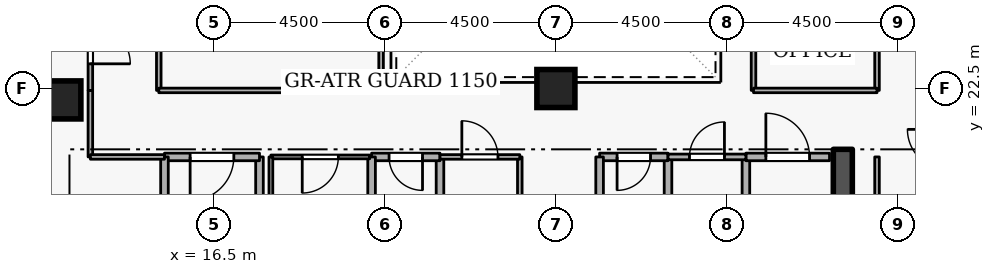
"""IFC4 building model, lengths in metres.
Left out: names, types, materials, properties, quantities, classifications, styles, units other than length and angle.
Written with IfcOpenShell. Run it as: python <this file> out.ifc"""

import sys

from ifc_helpers import new_model, si_unit, direction, frame, frame_2d, origin, origin_2d, place, context, subcontext, project, spatial, rectangle, extrude, element, fill, save


model = new_model("IFC4")
c1 = context("Model", 3, precision=1e-05, world=origin(), true_north=direction((0.0, 1.0)))
c2 = subcontext(c1, "Body", "Model", "MODEL_VIEW")
j1 = project(units=[si_unit("LENGTHUNIT", "METRE"), si_unit("PLANEANGLEUNIT", "RADIAN")], contexts=[c1])
p1 = place(None, origin())
s1 = spatial("IfcSite", under=j1, at=p1, CompositionType="ELEMENT")
p2 = place(p1, origin())
s2 = spatial("IfcBuilding", under=s1, at=p2, CompositionType="ELEMENT")
p3 = place(p2, frame((0.0, 0.0, 233.1)))
s3 = spatial("IfcBuildingStorey", under=s2, at=p3, CompositionType="ELEMENT", Elevation=233.1)
p4 = place(p3, frame((33.05, 15.1, 0.0), z_axis=(0.0, 0.0, 1.0), x_axis=(0.0, 1.0, 0.0)))
e1 = element("IfcWall", 1, at=p4, inside=s3, PredefinedType="SHEAR", context=c2, shape_type="SweptSolid", body=[
    extrude(rectangle(XDim=5.8, YDim=0.5, at=frame_2d((2.9, 0.0))), origin(), (0.0, 0.0, 1.0), 3.6),
])
for number, where, z_axis, x_axis in (
    (2, (12.5, 22.2, 0.0), (0.0, 0.0, 1.0), (1.0, 0.0, 0.0)),
    (3, (25.5, 22.5, 0.0), (0.0, 0.0, 1.0), (1.0, 0.0, 0.0)),
):
    element("IfcColumn", number, at=place(p3, frame(where, z_axis=z_axis, x_axis=x_axis)), inside=s3, PredefinedType="COLUMN", context=c2, shape_type="SweptSolid", body=[
        extrude(rectangle(XDim=1.0, YDim=1.0, at=origin_2d()), origin(), (0.0, 0.0, 1.0), 3.6),
    ])
p5 = place(p3, frame((17.7, 18.4, 0.0), z_axis=(0.0, 0.0, 1.0), x_axis=(0.0, 1.0, 0.0)))
e4 = element("IfcWall", 4, at=p5, inside=s3, PredefinedType="STANDARD", context=c2, shape_type="SweptSolid", body=[
    extrude(rectangle(XDim=2.3, YDim=0.2, at=frame_2d((1.15, 0.0))), origin(), (0.0, 0.0, 1.0), 2.545),
])
p6 = place(p3, frame((17.7, 20.7, 0.0), z_axis=(0.0, 0.0, 1.0), x_axis=(-1.0, 0.0, 0.0)))
e5 = element("IfcWall", 5, at=p6, inside=s3, PredefinedType="STANDARD", context=c2, shape_type="SweptSolid", body=[
    extrude(rectangle(XDim=2.5, YDim=0.2, at=frame_2d((1.25, 0.0))), origin(), (0.0, 0.0, 1.0), 3.34),
])
p7 = place(p6, frame((0.675, 0.0, 0.0)))
e6 = element("IfcOpeningElement", 6, at=p7, cuts=e5, PredefinedType="OPENING", context=c2, shape_type="SweptSolid", body=[
    extrude(rectangle(XDim=1.15, YDim=2.1, at=frame_2d((0.575, 1.05))), frame((0.0, 0.11, 0.0), z_axis=(0.0, -1.0, 0.0), x_axis=(1.0, 0.0, 0.0)), (0.0, 0.0, 1.0), 0.22),
])
p8 = place(p3, frame((15.2, 20.7, 0.0), z_axis=(0.0, 0.0, 1.0), x_axis=(0.0, -1.0, 0.0)))
e7 = element("IfcWall", 7, at=p8, inside=s3, PredefinedType="STANDARD", context=c2, shape_type="SweptSolid", body=[
    extrude(rectangle(XDim=5.7, YDim=0.2, at=frame_2d((2.85, 0.0))), origin(), (0.0, 0.0, 1.0), 3.34),
])
p9 = place(p3, frame((28.45, 18.65, 0.0), z_axis=(0.0, 0.0, 1.0), x_axis=(0.0, 1.0, 0.0)))
e8 = element("IfcWall", 8, at=p9, inside=s3, PredefinedType="STANDARD", context=c2, shape_type="SweptSolid", body=[
    extrude(rectangle(XDim=2.05, YDim=0.2, at=frame_2d((1.025, 0.0))), origin(), (0.0, 0.0, 1.0), 3.34),
])
p10 = place(p3, frame((28.45, 20.7, 0.0), z_axis=(0.0, 0.0, 1.0), x_axis=(-1.0, 0.0, 0.0)))
e9 = element("IfcWall", 9, at=p10, inside=s3, PredefinedType="STANDARD", context=c2, shape_type="SweptSolid", body=[
    extrude(rectangle(XDim=1.8, YDim=0.2, at=frame_2d((0.9, 0.0))), origin(), (0.0, 0.0, 1.0), 3.34),
])
p11 = place(p10, frame((0.46, 0.0, 0.0)))
e10 = element("IfcOpeningElement", 10, at=p11, cuts=e9, PredefinedType="OPENING", context=c2, shape_type="SweptSolid", body=[
    extrude(rectangle(XDim=0.88, YDim=2.04, at=frame_2d((0.44, 1.02))), frame((0.0, 0.11, 0.0), z_axis=(0.0, -1.0, 0.0), x_axis=(1.0, 0.0, 0.0)), (0.0, 0.0, 1.0), 0.22),
])
for number, where, z_axis, x_axis in (
    (11, (26.65, 20.7, 0.0), (0.0, 0.0, 1.0), (0.0, -1.0, 0.0)),
    (12, (22.45, 18.65, 0.0), (0.0, 0.0, 1.0), (0.0, 1.0, 0.0)),
):
    element("IfcWall", number, at=place(p3, frame(where, z_axis=z_axis, x_axis=x_axis)), inside=s3, PredefinedType="STANDARD", context=c2, shape_type="SweptSolid", body=[
        extrude(rectangle(XDim=2.05, YDim=0.2, at=frame_2d((1.025, 0.0))), origin(), (0.0, 0.0, 1.0), 3.34),
    ])
p12 = place(p3, frame((22.45, 20.7, 0.0), z_axis=(0.0, 0.0, 1.0), x_axis=(-1.0, 0.0, 0.0)))
e13 = element("IfcWall", 13, at=p12, inside=s3, PredefinedType="STANDARD", context=c2, shape_type="SweptSolid", body=[
    extrude(rectangle(XDim=1.8, YDim=0.2, at=frame_2d((0.9, 0.0))), origin(), (0.0, 0.0, 1.0), 3.34),
])
p13 = place(p12, frame((0.46, 0.0, 0.0)))
e14 = element("IfcOpeningElement", 14, at=p13, cuts=e13, PredefinedType="OPENING", context=c2, shape_type="SweptSolid", body=[
    extrude(rectangle(XDim=0.88, YDim=2.04, at=frame_2d((0.44, 1.02))), frame((0.0, 0.11, 0.0), z_axis=(0.0, -1.0, 0.0), x_axis=(1.0, 0.0, 0.0)), (0.0, 0.0, 1.0), 0.22),
])
for number, where, z_axis, x_axis in (
    (15, (20.65, 20.7, 0.0), (0.0, 0.0, 1.0), (0.0, -1.0, 0.0)),
    (16, (30.5, 18.65, 0.0), (0.0, 0.0, 1.0), (0.0, 1.0, 0.0)),
):
    element("IfcWall", number, at=place(p3, frame(where, z_axis=z_axis, x_axis=x_axis)), inside=s3, PredefinedType="STANDARD", context=c2, shape_type="SweptSolid", body=[
        extrude(rectangle(XDim=2.05, YDim=0.2, at=frame_2d((1.025, 0.0))), origin(), (0.0, 0.0, 1.0), 3.34),
    ])
p14 = place(p3, frame((30.5, 20.7, 0.0), z_axis=(0.0, 0.0, 1.0), x_axis=(1.0, 0.0, 0.0)))
e17 = element("IfcWall", 17, at=p14, inside=s3, PredefinedType="STANDARD", context=c2, shape_type="SweptSolid", body=[
    extrude(rectangle(XDim=2.2, YDim=0.2, at=frame_2d((1.1, 0.0))), origin(), (0.0, 0.0, 1.0), 3.34),
])
p15 = place(p14, frame((0.525, 0.0, 0.0)))
e18 = element("IfcOpeningElement", 18, at=p15, cuts=e17, PredefinedType="OPENING", context=c2, shape_type="SweptSolid", body=[
    extrude(rectangle(XDim=1.15, YDim=2.1, at=frame_2d((0.575, 1.05))), frame((0.0, 0.11, 0.0), z_axis=(0.0, -1.0, 0.0), x_axis=(1.0, 0.0, 0.0)), (0.0, 0.0, 1.0), 0.22),
])
p16 = place(p3, frame((20.6, 20.7, 0.0), z_axis=(0.0, 0.0, 1.0), x_axis=(-1.0, 0.0, 0.0)))
e19 = element("IfcWall", 19, at=p16, inside=s3, PredefinedType="PARTITIONING", context=c2, shape_type="SweptSolid", body=[
    extrude(rectangle(XDim=2.6, YDim=0.1, at=frame_2d((1.3, 0.0))), origin(), (0.0, 0.0, 1.0), 3.34),
])
p17 = place(p16, frame((0.825, 0.0, 0.0)))
e20 = element("IfcOpeningElement", 20, at=p17, cuts=e19, PredefinedType="OPENING", context=c2, shape_type="SweptSolid", body=[
    extrude(rectangle(XDim=0.95, YDim=2.1, at=frame_2d((0.475, 1.05))), frame((0.0, 0.06, 0.0), z_axis=(0.0, -1.0, 0.0), x_axis=(1.0, 0.0, 0.0)), (0.0, 0.0, 1.0), 0.12),
])
p18 = place(p3, frame((18.0, 20.7, 0.0), z_axis=(0.0, 0.0, 1.0), x_axis=(0.0, -1.0, 0.0)))
e21 = element("IfcWall", 21, at=p18, inside=s3, PredefinedType="PARTITIONING", context=c2, shape_type="SweptSolid", body=[
    extrude(rectangle(XDim=2.05, YDim=0.1, at=frame_2d((1.025, 0.0))), origin(), (0.0, 0.0, 1.0), 2.545),
])
p19 = place(p3, frame((24.55, 20.7, 0.0), z_axis=(0.0, 0.0, 1.0), x_axis=(0.0, -1.0, 0.0)))
e22 = element("IfcWall", 22, at=p19, inside=s3, PredefinedType="PARTITIONING", context=c2, shape_type="SweptSolid", body=[
    extrude(rectangle(XDim=2.05, YDim=0.12, at=frame_2d((1.025, 0.0))), origin(), (0.0, 0.0, 1.0), 3.34),
])
p20 = place(p3, frame((22.45, 20.7, 0.0), z_axis=(0.0, 0.0, 1.0), x_axis=(1.0, 0.0, 0.0)))
e23 = element("IfcWall", 23, at=p20, inside=s3, PredefinedType="PARTITIONING", context=c2, shape_type="SweptSolid", body=[
    extrude(rectangle(XDim=2.1, YDim=0.12, at=frame_2d((1.05, 0.0))), origin(), (0.0, 0.0, 1.0), 3.34),
])
p21 = place(p20, frame((0.575, 0.0, 0.0)))
e24 = element("IfcOpeningElement", 24, at=p21, cuts=e23, PredefinedType="OPENING", context=c2, shape_type="SweptSolid", body=[
    extrude(rectangle(XDim=0.95, YDim=2.1, at=frame_2d((0.475, 1.05))), frame((0.0, 0.07, 0.0), z_axis=(0.0, -1.0, 0.0), x_axis=(1.0, 0.0, 0.0)), (0.0, 0.0, 1.0), 0.14),
])
p22 = place(p3, frame((28.45, 20.7, 0.0), z_axis=(0.0, 0.0, 1.0), x_axis=(1.0, 0.0, 0.0)))
e25 = element("IfcWall", 25, at=p22, inside=s3, PredefinedType="PARTITIONING", context=c2, shape_type="SweptSolid", body=[
    extrude(rectangle(XDim=2.05, YDim=0.15, at=frame_2d((1.025, 0.0))), origin(), (0.0, 0.0, 1.0), 3.34),
])
p23 = place(p22, frame((0.565, 0.0, 0.0)))
e26 = element("IfcOpeningElement", 26, at=p23, cuts=e25, PredefinedType="OPENING", context=c2, shape_type="SweptSolid", body=[
    extrude(rectangle(XDim=0.92, YDim=2.08, at=frame_2d((0.46, 1.04))), frame((0.0, 0.085, 0.0), z_axis=(0.0, -1.0, 0.0), x_axis=(1.0, 0.0, 0.0)), (0.0, 0.0, 1.0), 0.17),
])
p24 = place(p3, frame((33.95, 20.7, 0.0), z_axis=(0.0, 0.0, 1.0), x_axis=(0.0, -1.0, 0.0)))
e27 = element("IfcWall", 27, at=p24, inside=s3, PredefinedType="PARTITIONING", context=c2, shape_type="SweptSolid", body=[
    extrude(rectangle(XDim=5.9, YDim=0.12, at=frame_2d((2.95, 0.0))), origin(), (0.0, 0.0, 1.0), 3.34),
])
p25 = place(p3, frame((13.25, 22.45, 0.0), z_axis=(0.0, 0.0, 1.0), x_axis=(0.0, -1.0, 0.0)))
e28 = element("IfcWall", 28, at=p25, inside=s3, PredefinedType="PARTITIONING", context=c2, shape_type="SweptSolid", body=[
    extrude(rectangle(XDim=1.75, YDim=0.12, at=frame_2d((0.875, 0.0))), origin(), (0.0, 0.0, 1.0), 3.34),
])
p26 = place(p3, frame((13.25, 20.7, 0.0), z_axis=(0.0, 0.0, 1.0), x_axis=(1.0, 0.0, 0.0)))
e29 = element("IfcWall", 29, at=p26, inside=s3, PredefinedType="PARTITIONING", context=c2, shape_type="SweptSolid", body=[
    extrude(rectangle(XDim=1.95, YDim=0.12, at=frame_2d((0.975, 0.0))), origin(), (0.0, 0.0, 1.0), 3.34),
])
p27 = place(p3, frame((13.25, 24.9, 0.0), z_axis=(0.0, 0.0, 1.0), x_axis=(0.0, -1.0, 0.0)))
e30 = element("IfcWall", 30, at=p27, inside=s3, PredefinedType="PARTITIONING", context=c2, shape_type="SweptSolid", body=[
    extrude(rectangle(XDim=2.45, YDim=0.12, at=frame_2d((1.225, 0.0))), origin(), (0.0, 0.0, 1.0), 3.34),
])
p28 = place(p27, frame((0.7, 0.0, 0.0)))
e31 = element("IfcOpeningElement", 31, at=p28, cuts=e30, PredefinedType="OPENING", context=c2, shape_type="SweptSolid", body=[
    extrude(rectangle(XDim=1.05, YDim=2.1, at=frame_2d((0.525, 1.05))), frame((0.0, 0.07, 0.0), z_axis=(0.0, -1.0, 0.0), x_axis=(1.0, 0.0, 0.0)), (0.0, 0.0, 1.0), 0.14),
])
p29 = place(p3, frame((15.05, 22.45, 0.0), z_axis=(0.0, 0.0, 1.0), x_axis=(0.0, 1.0, 0.0)))
e32 = element("IfcWall", 32, at=p29, inside=s3, PredefinedType="PARTITIONING", context=c2, shape_type="SweptSolid", body=[
    extrude(rectangle(XDim=9.1, YDim=0.12, at=frame_2d((4.55, 0.0))), origin(), (0.0, 0.0, 1.0), 3.34),
])
p30 = place(p29, frame((4.075, 0.0, 0.0)))
e33 = element("IfcOpeningElement", 33, at=p30, cuts=e32, PredefinedType="OPENING", context=c2, shape_type="SweptSolid", body=[
    extrude(rectangle(XDim=0.95, YDim=2.1, at=frame_2d((0.475, 1.05))), frame((0.0, 0.07, 0.0), z_axis=(0.0, -1.0, 0.0), x_axis=(1.0, 0.0, 0.0)), (0.0, 0.0, 1.0), 0.14),
])
p31 = place(p3, frame((20.9, 31.55, 0.0), z_axis=(0.0, 0.0, 1.0), x_axis=(0.0, -1.0, 0.0)))
e34 = element("IfcWall", 34, at=p31, inside=s3, PredefinedType="PARTITIONING", context=c2, shape_type="SweptSolid", body=[
    extrude(rectangle(XDim=9.1, YDim=0.12, at=frame_2d((4.55, 0.0))), origin(), (0.0, 0.0, 1.0), 3.34),
])
p32 = place(p3, frame((20.9, 22.45, 0.0), z_axis=(0.0, 0.0, 1.0), x_axis=(-1.0, 0.0, 0.0)))
e35 = element("IfcWall", 35, at=p32, inside=s3, PredefinedType="PARTITIONING", context=c2, shape_type="SweptSolid", body=[
    extrude(rectangle(XDim=5.85, YDim=0.12, at=frame_2d((2.925, 0.0))), origin(), (0.0, 0.0, 1.0), 3.34),
])
p33 = place(p3, frame((30.7, 22.45, 0.0), z_axis=(0.0, 0.0, 1.0), x_axis=(0.0, 1.0, 0.0)))
e36 = element("IfcWall", 36, at=p33, inside=s3, PredefinedType="PARTITIONING", context=c2, shape_type="SweptSolid", body=[
    extrude(rectangle(XDim=9.1, YDim=0.12, at=frame_2d((4.55, 0.0))), origin(), (0.0, 0.0, 1.0), 3.34),
])
p34 = place(p3, frame((33.95, 31.55, 0.0), z_axis=(0.0, 0.0, 1.0), x_axis=(0.0, -1.0, 0.0)))
e37 = element("IfcWall", 37, at=p34, inside=s3, PredefinedType="PARTITIONING", context=c2, shape_type="SweptSolid", body=[
    extrude(rectangle(XDim=9.1, YDim=0.12, at=frame_2d((4.55, 0.0))), origin(), (0.0, 0.0, 1.0), 3.34),
])
p35 = place(p34, frame((4.075, 0.0, 0.0)))
e38 = element("IfcOpeningElement", 38, at=p35, cuts=e37, PredefinedType="OPENING", context=c2, shape_type="SweptSolid", body=[
    extrude(rectangle(XDim=0.95, YDim=2.1, at=frame_2d((0.475, 1.05))), frame((0.0, 0.07, 0.0), z_axis=(0.0, -1.0, 0.0), x_axis=(1.0, 0.0, 0.0)), (0.0, 0.0, 1.0), 0.14),
])
p36 = place(p3, frame((33.95, 22.45, 0.0), z_axis=(0.0, 0.0, 1.0), x_axis=(-1.0, 0.0, 0.0)))
e39 = element("IfcWall", 39, at=p36, inside=s3, PredefinedType="PARTITIONING", context=c2, shape_type="SweptSolid", body=[
    extrude(rectangle(XDim=3.25, YDim=0.12, at=frame_2d((1.625, 0.0))), origin(), (0.0, 0.0, 1.0), 3.34),
])
p37 = place(p7, origin())
e40 = element("IfcDoor", 40, at=p37, inside=s3, OperationType="SINGLE_SWING_RIGHT", PredefinedType="DOOR", context=c2, shape_type="SweptSolid", body=[
    extrude(rectangle(XDim=1.15, YDim=2.1, at=frame_2d((0.575, 1.05))), frame((0.0, 0.025, 0.0), z_axis=(0.0, -1.0, 0.0), x_axis=(1.0, 0.0, 0.0)), (0.0, 0.0, 1.0), 0.05),
])
fill(e6, e40)
p38 = place(p11, origin())
e41 = element("IfcDoor", 41, at=p38, inside=s3, OperationType="SINGLE_SWING_RIGHT", PredefinedType="DOOR", context=c2, shape_type="SweptSolid", body=[
    extrude(rectangle(XDim=0.88, YDim=2.04, at=frame_2d((0.44, 1.02))), frame((0.0, 0.025, 0.0), z_axis=(0.0, -1.0, 0.0), x_axis=(1.0, 0.0, 0.0)), (0.0, 0.0, 1.0), 0.05),
])
fill(e10, e41)
p39 = place(p13, origin())
e42 = element("IfcDoor", 42, at=p39, inside=s3, OperationType="SINGLE_SWING_LEFT", PredefinedType="DOOR", context=c2, shape_type="SweptSolid", body=[
    extrude(rectangle(XDim=0.88, YDim=2.04, at=frame_2d((0.44, 1.02))), frame((0.0, 0.025, 0.0), z_axis=(0.0, -1.0, 0.0), x_axis=(1.0, 0.0, 0.0)), (0.0, 0.0, 1.0), 0.05),
])
fill(e14, e42)
p40 = place(p17, origin())
e43 = element("IfcDoor", 43, at=p40, inside=s3, OperationType="SINGLE_SWING_RIGHT", PredefinedType="DOOR", context=c2, shape_type="SweptSolid", body=[
    extrude(rectangle(XDim=0.95, YDim=2.1, at=frame_2d((0.475, 1.05))), frame((0.0, 0.025, 0.0), z_axis=(0.0, -1.0, 0.0), x_axis=(1.0, 0.0, 0.0)), (0.0, 0.0, 1.0), 0.05),
])
fill(e20, e43)
p41 = place(p21, origin())
e44 = element("IfcDoor", 44, at=p41, inside=s3, OperationType="SINGLE_SWING_LEFT", PredefinedType="DOOR", context=c2, shape_type="SweptSolid", body=[
    extrude(rectangle(XDim=0.95, YDim=2.1, at=frame_2d((0.475, 1.05))), frame((0.0, 0.025, 0.0), z_axis=(0.0, -1.0, 0.0), x_axis=(1.0, 0.0, 0.0)), (0.0, 0.0, 1.0), 0.05),
])
fill(e24, e44)
p42 = place(p23, origin())
e45 = element("IfcDoor", 45, at=p42, inside=s3, OperationType="SINGLE_SWING_RIGHT", PredefinedType="DOOR", context=c2, shape_type="SweptSolid", body=[
    extrude(rectangle(XDim=0.92, YDim=2.08, at=frame_2d((0.46, 1.04))), frame((0.0, 0.025, 0.0), z_axis=(0.0, -1.0, 0.0), x_axis=(1.0, 0.0, 0.0)), (0.0, 0.0, 1.0), 0.05),
])
fill(e26, e45)
p43 = place(p15, origin())
e46 = element("IfcDoor", 46, at=p43, inside=s3, OperationType="SINGLE_SWING_LEFT", PredefinedType="DOOR", context=c2, shape_type="SweptSolid", body=[
    extrude(rectangle(XDim=1.15, YDim=2.1, at=frame_2d((0.575, 1.05))), frame((0.0, 0.025, 0.0), z_axis=(0.0, -1.0, 0.0), x_axis=(1.0, 0.0, 0.0)), (0.0, 0.0, 1.0), 0.05),
])
fill(e18, e46)
p44 = place(p28, origin())
e47 = element("IfcDoor", 47, at=p44, inside=s3, OperationType="SINGLE_SWING_RIGHT", PredefinedType="DOOR", context=c2, shape_type="SweptSolid", body=[
    extrude(rectangle(XDim=1.05, YDim=2.1, at=frame_2d((0.525, 1.05))), frame((0.0, 0.025, 0.0), z_axis=(0.0, -1.0, 0.0), x_axis=(1.0, 0.0, 0.0)), (0.0, 0.0, 1.0), 0.05),
])
fill(e31, e47)
save(model, sys.argv[1])
